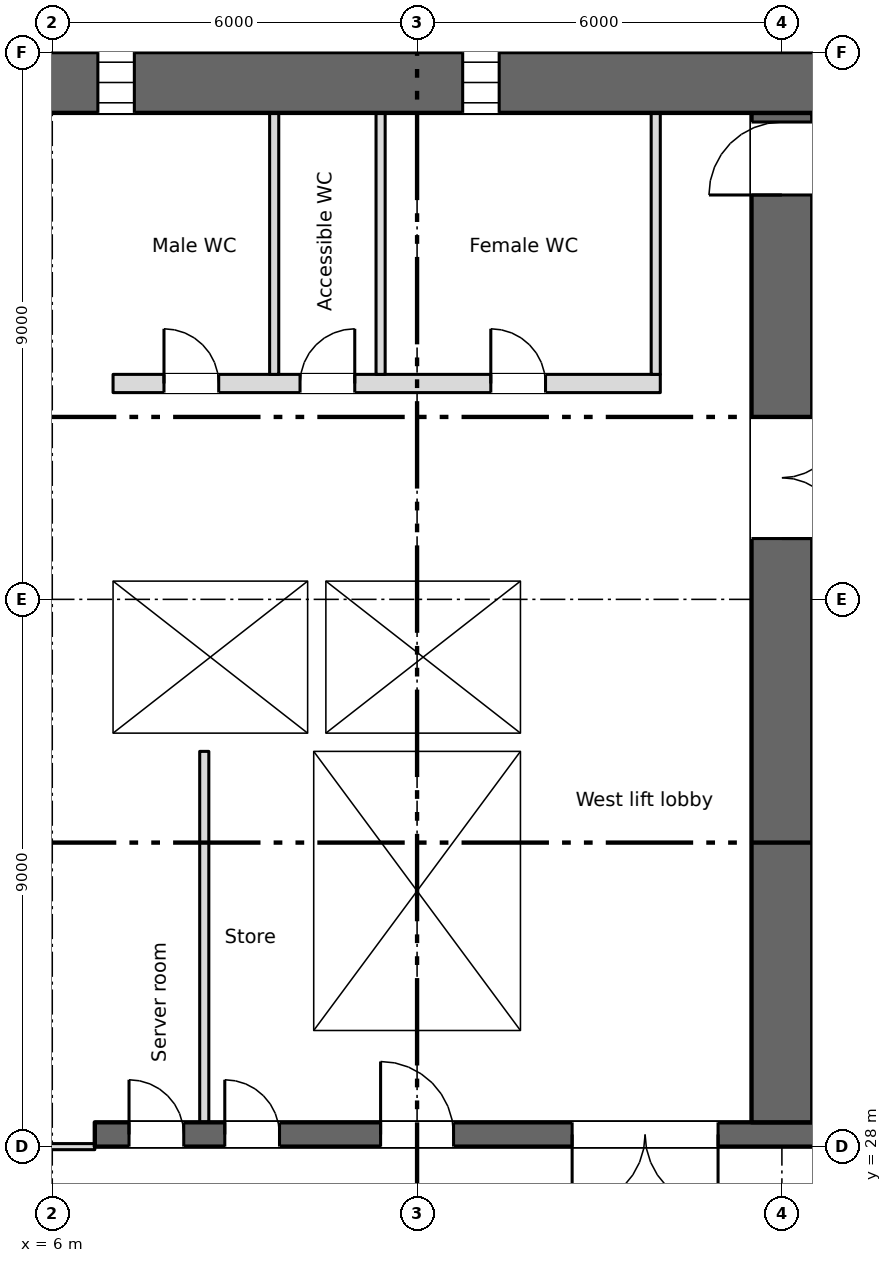
"""IFC4 building model, lengths in metres.
Left out: names, types, materials, properties, quantities, classifications, styles, units other than length and angle.
Written with IfcOpenShell. Run it as: python <this file> out.ifc"""

import sys

from ifc_helpers import new_model, si_unit, direction, frame, frame_2d, origin, place, context, subcontext, project, spatial, rectangle, extrude, element, fill, save


model = new_model("IFC4")
c1 = context("Model", 3, precision=1e-05, world=origin(), true_north=direction((0.0, 1.0)))
c2 = subcontext(c1, "Body", "Model", "MODEL_VIEW")
j1 = project(units=[si_unit("LENGTHUNIT", "METRE"), si_unit("PLANEANGLEUNIT", "RADIAN")], contexts=[c1])
p1 = place(None, origin())
s1 = spatial("IfcSite", under=j1, at=p1, CompositionType="ELEMENT")
p2 = place(p1, origin())
s2 = spatial("IfcBuilding", under=s1, at=p2, CompositionType="ELEMENT")
p3 = place(p2, frame((0.0, 0.0, 45.0)))
s3 = spatial("IfcBuildingStorey", under=s2, at=p3, CompositionType="ELEMENT", Elevation=45.0)
p4 = place(p3, frame((5.55, 45.5, 0.0), z_axis=(0.0, 0.0, 1.0), x_axis=(1.0, 0.0, 0.0)))
e1 = element("IfcWall", 1, at=p4, inside=s3, PredefinedType="SHEAR", context=c2, shape_type="SweptSolid", body=[
    extrude(rectangle(XDim=66.9, YDim=1.0, at=frame_2d((33.45, 0.0))), origin(), (0.0, 0.0, 1.0), 3.35),
])
p5 = place(p4, frame((1.2, 0.0, 0.6)))
e2 = element("IfcOpeningElement", 2, at=p5, cuts=e1, PredefinedType="OPENING", context=c2, shape_type="SweptSolid", body=[
    extrude(rectangle(XDim=0.6, YDim=2.4, at=frame_2d((0.3, 1.2))), frame((0.0, 0.51, 0.0), z_axis=(0.0, -1.0, 0.0), x_axis=(1.0, 0.0, 0.0)), (0.0, 0.0, 1.0), 1.02),
])
p6 = place(p4, frame((7.2, 0.0, 0.6)))
e3 = element("IfcOpeningElement", 3, at=p6, cuts=e1, PredefinedType="OPENING", context=c2, shape_type="SweptSolid", body=[
    extrude(rectangle(XDim=0.6, YDim=2.4, at=frame_2d((0.3, 1.2))), frame((0.0, 0.51, 0.0), z_axis=(0.0, -1.0, 0.0), x_axis=(1.0, 0.0, 0.0)), (0.0, 0.0, 1.0), 1.02),
])
p7 = place(p4, frame((55.2, 0.0, 0.6)))
e4 = element("IfcOpeningElement", 4, at=p7, cuts=e1, PredefinedType="OPENING", context=c2, shape_type="SweptSolid", body=[
    extrude(rectangle(XDim=0.6, YDim=2.4, at=frame_2d((0.3, 1.2))), frame((0.0, 0.51, 0.0), z_axis=(0.0, -1.0, 0.0), x_axis=(1.0, 0.0, 0.0)), (0.0, 0.0, 1.0), 1.02),
])
p8 = place(p4, frame((61.2, 0.0, 0.6)))
e5 = element("IfcOpeningElement", 5, at=p8, cuts=e1, PredefinedType="OPENING", context=c2, shape_type="SweptSolid", body=[
    extrude(rectangle(XDim=0.6, YDim=2.4, at=frame_2d((0.3, 1.2))), frame((0.0, 0.51, 0.0), z_axis=(0.0, -1.0, 0.0), x_axis=(1.0, 0.0, 0.0)), (0.0, 0.0, 1.0), 1.02),
])
p9 = place(p3, frame((6.7, 28.2, 0.0), z_axis=(0.0, 0.0, 1.0), x_axis=(1.0, 0.0, 0.0)))
e6 = element("IfcWall", 6, at=p9, inside=s3, PredefinedType="SHEAR", context=c2, shape_type="SweptSolid", body=[
    extrude(rectangle(XDim=57.8, YDim=0.4, at=frame_2d((28.9, 0.0))), origin(), (0.0, 0.0, 1.0), 3.35),
])
p10 = place(p9, frame((12.812, 0.0, 0.0)))
e7 = element("IfcOpeningElement", 7, at=p10, cuts=e6, PredefinedType="OPENING", context=c2, shape_type="SweptSolid", body=[
    extrude(rectangle(XDim=0.9, YDim=2.1, at=frame_2d((0.45, 1.05))), frame((0.0, 0.21, 0.0), z_axis=(0.0, -1.0, 0.0), x_axis=(1.0, 0.0, 0.0)), (0.0, 0.0, 1.0), 0.42),
])
p11 = place(p9, frame((15.387, 0.0, 0.0)))
e8 = element("IfcOpeningElement", 8, at=p11, cuts=e6, PredefinedType="OPENING", context=c2, shape_type="SweptSolid", body=[
    extrude(rectangle(XDim=0.9, YDim=2.1, at=frame_2d((0.45, 1.05))), frame((0.0, 0.21, 0.0), z_axis=(0.0, -1.0, 0.0), x_axis=(1.0, 0.0, 0.0)), (0.0, 0.0, 1.0), 0.42),
])
p12 = place(p9, frame((48.312, 0.0, 0.0)))
e9 = element("IfcOpeningElement", 9, at=p12, cuts=e6, PredefinedType="OPENING", context=c2, shape_type="SweptSolid", body=[
    extrude(rectangle(XDim=0.9, YDim=2.1, at=frame_2d((0.45, 1.05))), frame((0.0, 0.21, 0.0), z_axis=(0.0, -1.0, 0.0), x_axis=(1.0, 0.0, 0.0)), (0.0, 0.0, 1.0), 0.42),
])
p13 = place(p9, frame((50.887, 0.0, 0.0)))
e10 = element("IfcOpeningElement", 10, at=p13, cuts=e6, PredefinedType="OPENING", context=c2, shape_type="SweptSolid", body=[
    extrude(rectangle(XDim=0.9, YDim=2.1, at=frame_2d((0.45, 1.05))), frame((0.0, 0.21, 0.0), z_axis=(0.0, -1.0, 0.0), x_axis=(1.0, 0.0, 0.0)), (0.0, 0.0, 1.0), 0.42),
])
p14 = place(p9, frame((0.562, 0.0, 0.0)))
e11 = element("IfcOpeningElement", 11, at=p14, cuts=e6, PredefinedType="OPENING", context=c2, shape_type="SweptSolid", body=[
    extrude(rectangle(XDim=0.9, YDim=2.1, at=frame_2d((0.45, 1.05))), frame((0.0, 0.21, 0.0), z_axis=(0.0, -1.0, 0.0), x_axis=(1.0, 0.0, 0.0)), (0.0, 0.0, 1.0), 0.42),
])
p15 = place(p9, frame((2.137, 0.0, 0.0)))
e12 = element("IfcOpeningElement", 12, at=p15, cuts=e6, PredefinedType="OPENING", context=c2, shape_type="SweptSolid", body=[
    extrude(rectangle(XDim=0.9, YDim=2.1, at=frame_2d((0.45, 1.05))), frame((0.0, 0.21, 0.0), z_axis=(0.0, -1.0, 0.0), x_axis=(1.0, 0.0, 0.0)), (0.0, 0.0, 1.0), 0.42),
])
p16 = place(p9, frame((4.7, 0.0, 0.0)))
e13 = element("IfcOpeningElement", 13, at=p16, cuts=e6, PredefinedType="OPENING", context=c2, shape_type="SweptSolid", body=[
    extrude(rectangle(XDim=1.2, YDim=2.1, at=frame_2d((0.6, 1.05))), frame((0.0, 0.21, 0.0), z_axis=(0.0, -1.0, 0.0), x_axis=(1.0, 0.0, 0.0)), (0.0, 0.0, 1.0), 0.42),
])
p17 = place(p9, frame((31.7, 0.0, 0.0)))
e14 = element("IfcOpeningElement", 14, at=p17, cuts=e6, PredefinedType="OPENING", context=c2, shape_type="SweptSolid", body=[
    extrude(rectangle(XDim=1.2, YDim=2.1, at=frame_2d((0.6, 1.05))), frame((0.0, 0.21, 0.0), z_axis=(0.0, -1.0, 0.0), x_axis=(1.0, 0.0, 0.0)), (0.0, 0.0, 1.0), 0.42),
])
p18 = place(p9, frame((55.2, 0.0, 0.0)))
e15 = element("IfcOpeningElement", 15, at=p18, cuts=e6, PredefinedType="OPENING", context=c2, shape_type="SweptSolid", body=[
    extrude(rectangle(XDim=1.2, YDim=2.1, at=frame_2d((0.6, 1.05))), frame((0.0, 0.21, 0.0), z_axis=(0.0, -1.0, 0.0), x_axis=(1.0, 0.0, 0.0)), (0.0, 0.0, 1.0), 0.42),
])
p19 = place(p9, frame((21.7, 0.0, 0.0)))
e16 = element("IfcOpeningElement", 16, at=p19, cuts=e6, PredefinedType="OPENING", context=c2, shape_type="SweptSolid", body=[
    extrude(rectangle(XDim=1.2, YDim=2.1, at=frame_2d((0.6, 1.05))), frame((0.0, 0.21, 0.0), z_axis=(0.0, -1.0, 0.0), x_axis=(1.0, 0.0, 0.0)), (0.0, 0.0, 1.0), 0.42),
])
p20 = place(p9, frame((41.7, 0.0, 0.0)))
e17 = element("IfcOpeningElement", 17, at=p20, cuts=e6, PredefinedType="OPENING", context=c2, shape_type="SweptSolid", body=[
    extrude(rectangle(XDim=1.2, YDim=2.1, at=frame_2d((0.6, 1.05))), frame((0.0, 0.21, 0.0), z_axis=(0.0, -1.0, 0.0), x_axis=(1.0, 0.0, 0.0)), (0.0, 0.0, 1.0), 0.42),
])
p21 = place(p9, frame((24.85, 0.0, 0.0)))
e18 = element("IfcOpeningElement", 18, at=p21, cuts=e6, PredefinedType="OPENING", context=c2, shape_type="SweptSolid", body=[
    extrude(rectangle(XDim=2.4, YDim=2.1, at=frame_2d((1.2, 1.05))), frame((0.0, 0.21, 0.0), z_axis=(0.0, -1.0, 0.0), x_axis=(1.0, 0.0, 0.0)), (0.0, 0.0, 1.0), 0.42),
])
p22 = place(p9, frame((37.35, 0.0, 0.0)))
e19 = element("IfcOpeningElement", 19, at=p22, cuts=e6, PredefinedType="OPENING", context=c2, shape_type="SweptSolid", body=[
    extrude(rectangle(XDim=2.4, YDim=2.1, at=frame_2d((1.2, 1.05))), frame((0.0, 0.21, 0.0), z_axis=(0.0, -1.0, 0.0), x_axis=(1.0, 0.0, 0.0)), (0.0, 0.0, 1.0), 0.42),
])
p23 = place(p9, frame((7.85, 0.0, 0.0)))
e20 = element("IfcOpeningElement", 20, at=p23, cuts=e6, PredefinedType="OPENING", context=c2, shape_type="SweptSolid", body=[
    extrude(rectangle(XDim=2.4, YDim=2.1, at=frame_2d((1.2, 1.05))), frame((0.0, 0.21, 0.0), z_axis=(0.0, -1.0, 0.0), x_axis=(1.0, 0.0, 0.0)), (0.0, 0.0, 1.0), 0.42),
])
p24 = place(p9, frame((28.85, 0.0, 0.0)))
e21 = element("IfcOpeningElement", 21, at=p24, cuts=e6, PredefinedType="OPENING", context=c2, shape_type="SweptSolid", body=[
    extrude(rectangle(XDim=0.9, YDim=2.1, at=frame_2d((0.45, 1.05))), frame((0.0, 0.21, 0.0), z_axis=(0.0, -1.0, 0.0), x_axis=(1.0, 0.0, 0.0)), (0.0, 0.0, 1.0), 0.42),
])
p25 = place(p9, frame((34.85, 0.0, 0.0)))
e22 = element("IfcOpeningElement", 22, at=p25, cuts=e6, PredefinedType="OPENING", context=c2, shape_type="SweptSolid", body=[
    extrude(rectangle(XDim=0.9, YDim=2.1, at=frame_2d((0.45, 1.05))), frame((0.0, 0.21, 0.0), z_axis=(0.0, -1.0, 0.0), x_axis=(1.0, 0.0, 0.0)), (0.0, 0.0, 1.0), 0.42),
])
p26 = place(p3, frame((6.85, 28.4, 0.0), z_axis=(0.0, 0.0, 1.0), x_axis=(0.0, 1.0, 0.0)))
e23 = element("IfcWall", 23, at=p26, inside=s3, PredefinedType="SHEAR", context=c2, shape_type="SweptSolid", body=[
    extrude(rectangle(XDim=16.6, YDim=0.3, at=frame_2d((8.3, 0.0))), origin(), (0.0, 0.0, 1.0), 3.35),
])
p27 = place(p3, frame((18.0, 28.4, 0.0), z_axis=(0.0, 0.0, 1.0), x_axis=(0.0, 1.0, 0.0)))
e24 = element("IfcWall", 24, at=p27, inside=s3, PredefinedType="SHEAR", context=c2, shape_type="SweptSolid", body=[
    extrude(rectangle(XDim=16.6, YDim=1.0, at=frame_2d((8.3, 0.0))), origin(), (0.0, 0.0, 1.0), 3.35),
])
p28 = place(p27, frame((9.6, 0.0, 0.0)))
e25 = element("IfcOpeningElement", 25, at=p28, cuts=e24, PredefinedType="OPENING", context=c2, shape_type="SweptSolid", body=[
    extrude(rectangle(XDim=2.0, YDim=2.1, at=frame_2d((1.0, 1.05))), frame((0.0, 0.51, 0.0), z_axis=(0.0, -1.0, 0.0), x_axis=(1.0, 0.0, 0.0)), (0.0, 0.0, 1.0), 1.02),
])
p29 = place(p27, frame((15.25, 0.0, 0.0)))
e26 = element("IfcOpeningElement", 26, at=p29, cuts=e24, PredefinedType="OPENING", context=c2, shape_type="SweptSolid", body=[
    extrude(rectangle(XDim=1.2, YDim=2.1, at=frame_2d((0.6, 1.05))), frame((0.0, 0.51, 0.0), z_axis=(0.0, -1.0, 0.0), x_axis=(1.0, 0.0, 0.0)), (0.0, 0.0, 1.0), 1.02),
])
for number, where, z_axis, x_axis in (
    (27, (10.15, 28.4, 0.0), (0.0, 0.0, 1.0), (0.0, 1.0, 0.0)),
    (28, (13.85, 28.4, 0.0), (0.0, 0.0, 1.0), (0.0, 1.0, 0.0)),
):
    element("IfcWall", number, at=place(p3, frame(where, z_axis=z_axis, x_axis=x_axis)), inside=s3, PredefinedType="SHEAR", context=c2, shape_type="SweptSolid", body=[
        extrude(rectangle(XDim=6.1, YDim=0.3, at=frame_2d((3.05, 0.0))), origin(), (0.0, 0.0, 1.0), 3.35),
    ])
for number, where, z_axis, x_axis in (
    (29, (7.0, 34.65, 0.0), (0.0, 0.0, 1.0), (1.0, 0.0, 0.0)),
    (30, (7.0, 37.45, 0.0), (0.0, 0.0, 1.0), (1.0, 0.0, 0.0)),
):
    element("IfcWall", number, at=place(p3, frame(where, z_axis=z_axis, x_axis=x_axis)), inside=s3, PredefinedType="SHEAR", context=c2, shape_type="SweptSolid", body=[
        extrude(rectangle(XDim=7.0, YDim=0.3, at=frame_2d((3.5, 0.0))), origin(), (0.0, 0.0, 1.0), 3.35),
    ])
p30 = place(p3, frame((13.85, 34.8, 0.0), z_axis=(0.0, 0.0, 1.0), x_axis=(0.0, 1.0, 0.0)))
e31 = element("IfcWall", 31, at=p30, inside=s3, PredefinedType="SHEAR", context=c2, shape_type="SweptSolid", body=[
    extrude(rectangle(XDim=2.5, YDim=0.3, at=frame_2d((1.25, 0.0))), origin(), (0.0, 0.0, 1.0), 3.35),
])
p31 = place(p3, frame((7.0, 40.55, 0.0), z_axis=(0.0, 0.0, 1.0), x_axis=(1.0, 0.0, 0.0)))
e32 = element("IfcWall", 32, at=p31, inside=s3, PredefinedType="PARTITIONING", context=c2, shape_type="SweptSolid", body=[
    extrude(rectangle(XDim=9.0, YDim=0.3, at=frame_2d((4.5, 0.0))), origin(), (0.0, 0.0, 1.0), 3.35),
])
p32 = place(p31, frame((0.837, 0.0, 0.0)))
e33 = element("IfcOpeningElement", 33, at=p32, cuts=e32, PredefinedType="OPENING", context=c2, shape_type="SweptSolid", body=[
    extrude(rectangle(XDim=0.9, YDim=2.1, at=frame_2d((0.45, 1.05))), frame((0.0, 0.16, 0.0), z_axis=(0.0, -1.0, 0.0), x_axis=(1.0, 0.0, 0.0)), (0.0, 0.0, 1.0), 0.32),
])
p33 = place(p31, frame((3.075, 0.0, 0.0)))
e34 = element("IfcOpeningElement", 34, at=p33, cuts=e32, PredefinedType="OPENING", context=c2, shape_type="SweptSolid", body=[
    extrude(rectangle(XDim=0.9, YDim=2.1, at=frame_2d((0.45, 1.05))), frame((0.0, 0.16, 0.0), z_axis=(0.0, -1.0, 0.0), x_axis=(1.0, 0.0, 0.0)), (0.0, 0.0, 1.0), 0.32),
])
p34 = place(p31, frame((6.212, 0.0, 0.0)))
e35 = element("IfcOpeningElement", 35, at=p34, cuts=e32, PredefinedType="OPENING", context=c2, shape_type="SweptSolid", body=[
    extrude(rectangle(XDim=0.9, YDim=2.1, at=frame_2d((0.45, 1.05))), frame((0.0, 0.16, 0.0), z_axis=(0.0, -1.0, 0.0), x_axis=(1.0, 0.0, 0.0)), (0.0, 0.0, 1.0), 0.32),
])
p35 = place(p3, frame((10.35, 34.8, 0.0), z_axis=(0.0, 0.0, 1.0), x_axis=(0.0, 1.0, 0.0)))
e36 = element("IfcWall", 36, at=p35, inside=s3, PredefinedType="SHEAR", context=c2, shape_type="SweptSolid", body=[
    extrude(rectangle(XDim=2.5, YDim=0.3, at=frame_2d((1.25, 0.0))), origin(), (0.0, 0.0, 1.0), 3.35),
])
p36 = place(p3, frame((15.925, 40.7, 0.0), z_axis=(0.0, 0.0, 1.0), x_axis=(0.0, 1.0, 0.0)))
e37 = element("IfcWall", 37, at=p36, inside=s3, PredefinedType="PARTITIONING", context=c2, shape_type="SweptSolid", body=[
    extrude(rectangle(XDim=4.3, YDim=0.15, at=frame_2d((2.15, 0.0))), origin(), (0.0, 0.0, 1.0), 3.35),
])
p37 = place(p3, frame((8.5, 28.4, 0.0), z_axis=(0.0, 0.0, 1.0), x_axis=(0.0, 1.0, 0.0)))
e38 = element("IfcWall", 38, at=p37, inside=s3, PredefinedType="PARTITIONING", context=c2, shape_type="SweptSolid", body=[
    extrude(rectangle(XDim=6.1, YDim=0.15, at=frame_2d((3.05, 0.0))), origin(), (0.0, 0.0, 1.0), 3.35),
])
for number, where, z_axis, x_axis in (
    (39, (9.65, 40.7, 0.0), (0.0, 0.0, 1.0), (0.0, 1.0, 0.0)),
    (40, (11.4, 40.7, 0.0), (0.0, 0.0, 1.0), (0.0, 1.0, 0.0)),
):
    element("IfcWall", number, at=place(p3, frame(where, z_axis=z_axis, x_axis=x_axis)), inside=s3, PredefinedType="PARTITIONING", context=c2, shape_type="SweptSolid", body=[
        extrude(rectangle(XDim=4.3, YDim=0.15, at=frame_2d((2.15, 0.0))), origin(), (0.0, 0.0, 1.0), 3.35),
    ])
p38 = place(p3, frame((0.8, 28.0, 0.0), z_axis=(0.0, 0.0, 1.0), x_axis=(1.0, 0.0, 0.0)))
e41 = element("IfcWall", 41, at=p38, inside=s3, PredefinedType="PARTITIONING", context=c2, shape_type="SweptSolid", body=[
    extrude(rectangle(XDim=5.9, YDim=0.1, at=frame_2d((2.95, 0.0))), origin(), (0.0, 0.0, 1.0), 3.35),
])
p39 = place(p38, frame((2.05, 0.0, 0.0)))
e42 = element("IfcOpeningElement", 42, at=p39, cuts=e41, PredefinedType="OPENING", context=c2, shape_type="SweptSolid", body=[
    extrude(rectangle(XDim=1.8, YDim=2.1, at=frame_2d((0.9, 1.05))), frame((0.0, 0.06, 0.0), z_axis=(0.0, -1.0, 0.0), x_axis=(1.0, 0.0, 0.0)), (0.0, 0.0, 1.0), 0.12),
])
p40 = place(p5, origin())
e43 = element("IfcWindow", 43, at=p40, inside=s3, PartitioningType="SINGLE_PANEL", PredefinedType="WINDOW", context=c2, shape_type="SweptSolid", body=[
    extrude(rectangle(XDim=0.6, YDim=2.4, at=frame_2d((0.3, 1.2))), frame((0.0, 0.03, 0.0), z_axis=(0.0, -1.0, 0.0), x_axis=(1.0, 0.0, 0.0)), (0.0, 0.0, 1.0), 0.06),
])
fill(e2, e43)
p41 = place(p6, origin())
e44 = element("IfcWindow", 44, at=p41, inside=s3, PartitioningType="SINGLE_PANEL", PredefinedType="WINDOW", context=c2, shape_type="SweptSolid", body=[
    extrude(rectangle(XDim=0.6, YDim=2.4, at=frame_2d((0.3, 1.2))), frame((0.0, 0.03, 0.0), z_axis=(0.0, -1.0, 0.0), x_axis=(1.0, 0.0, 0.0)), (0.0, 0.0, 1.0), 0.06),
])
fill(e3, e44)
p42 = place(p14, origin())
e45 = element("IfcDoor", 45, at=p42, inside=s3, OperationType="SINGLE_SWING_LEFT", PredefinedType="DOOR", context=c2, shape_type="SweptSolid", body=[
    extrude(rectangle(XDim=0.9, YDim=2.1, at=frame_2d((0.45, 1.05))), frame((0.0, 0.025, 0.0), z_axis=(0.0, -1.0, 0.0), x_axis=(1.0, 0.0, 0.0)), (0.0, 0.0, 1.0), 0.05),
])
fill(e11, e45)
p43 = place(p15, origin())
e46 = element("IfcDoor", 46, at=p43, inside=s3, OperationType="SINGLE_SWING_LEFT", PredefinedType="DOOR", context=c2, shape_type="SweptSolid", body=[
    extrude(rectangle(XDim=0.9, YDim=2.1, at=frame_2d((0.45, 1.05))), frame((0.0, 0.025, 0.0), z_axis=(0.0, -1.0, 0.0), x_axis=(1.0, 0.0, 0.0)), (0.0, 0.0, 1.0), 0.05),
])
fill(e12, e46)
p44 = place(p32, origin())
e47 = element("IfcDoor", 47, at=p44, inside=s3, OperationType="SINGLE_SWING_LEFT", PredefinedType="DOOR", context=c2, shape_type="SweptSolid", body=[
    extrude(rectangle(XDim=0.9, YDim=2.1, at=frame_2d((0.45, 1.05))), frame((0.0, 0.025, 0.0), z_axis=(0.0, -1.0, 0.0), x_axis=(1.0, 0.0, 0.0)), (0.0, 0.0, 1.0), 0.05),
])
fill(e33, e47)
p45 = place(p33, origin())
e48 = element("IfcDoor", 48, at=p45, inside=s3, OperationType="SINGLE_SWING_RIGHT", PredefinedType="DOOR", context=c2, shape_type="SweptSolid", body=[
    extrude(rectangle(XDim=0.9, YDim=2.1, at=frame_2d((0.45, 1.05))), frame((0.0, 0.025, 0.0), z_axis=(0.0, -1.0, 0.0), x_axis=(1.0, 0.0, 0.0)), (0.0, 0.0, 1.0), 0.05),
])
fill(e34, e48)
p46 = place(p34, origin())
e49 = element("IfcDoor", 49, at=p46, inside=s3, OperationType="SINGLE_SWING_LEFT", PredefinedType="DOOR", context=c2, shape_type="SweptSolid", body=[
    extrude(rectangle(XDim=0.9, YDim=2.1, at=frame_2d((0.45, 1.05))), frame((0.0, 0.025, 0.0), z_axis=(0.0, -1.0, 0.0), x_axis=(1.0, 0.0, 0.0)), (0.0, 0.0, 1.0), 0.05),
])
fill(e35, e49)
p47 = place(p16, origin())
e50 = element("IfcDoor", 50, at=p47, inside=s3, OperationType="SINGLE_SWING_LEFT", PredefinedType="DOOR", context=c2, shape_type="SweptSolid", body=[
    extrude(rectangle(XDim=1.2, YDim=2.1, at=frame_2d((0.6, 1.05))), frame((0.0, 0.025, 0.0), z_axis=(0.0, -1.0, 0.0), x_axis=(1.0, 0.0, 0.0)), (0.0, 0.0, 1.0), 0.05),
])
fill(e13, e50)
p48 = place(p23, origin())
e51 = element("IfcDoor", 51, at=p48, inside=s3, OperationType="DOUBLE_DOOR_SINGLE_SWING", PredefinedType="DOOR", context=c2, shape_type="SweptSolid", body=[
    extrude(rectangle(XDim=2.4, YDim=2.1, at=frame_2d((1.2, 1.05))), frame((0.0, 0.025, 0.0), z_axis=(0.0, -1.0, 0.0), x_axis=(1.0, 0.0, 0.0)), (0.0, 0.0, 1.0), 0.05),
])
fill(e20, e51)
p49 = place(p28, origin())
e52 = element("IfcDoor", 52, at=p49, inside=s3, OperationType="DOUBLE_DOOR_SINGLE_SWING", PredefinedType="DOOR", context=c2, shape_type="SweptSolid", body=[
    extrude(rectangle(XDim=2.0, YDim=2.1, at=frame_2d((1.0, 1.05))), frame((0.0, 0.025, 0.0), z_axis=(0.0, -1.0, 0.0), x_axis=(1.0, 0.0, 0.0)), (0.0, 0.0, 1.0), 0.05),
])
fill(e25, e52)
p50 = place(p29, origin())
e53 = element("IfcDoor", 53, at=p50, inside=s3, OperationType="SINGLE_SWING_LEFT", PredefinedType="DOOR", context=c2, shape_type="SweptSolid", body=[
    extrude(rectangle(XDim=1.2, YDim=2.1, at=frame_2d((0.6, 1.05))), frame((0.0, 0.025, 0.0), z_axis=(0.0, -1.0, 0.0), x_axis=(1.0, 0.0, 0.0)), (0.0, 0.0, 1.0), 0.05),
])
fill(e26, e53)
save(model, sys.argv[1])
